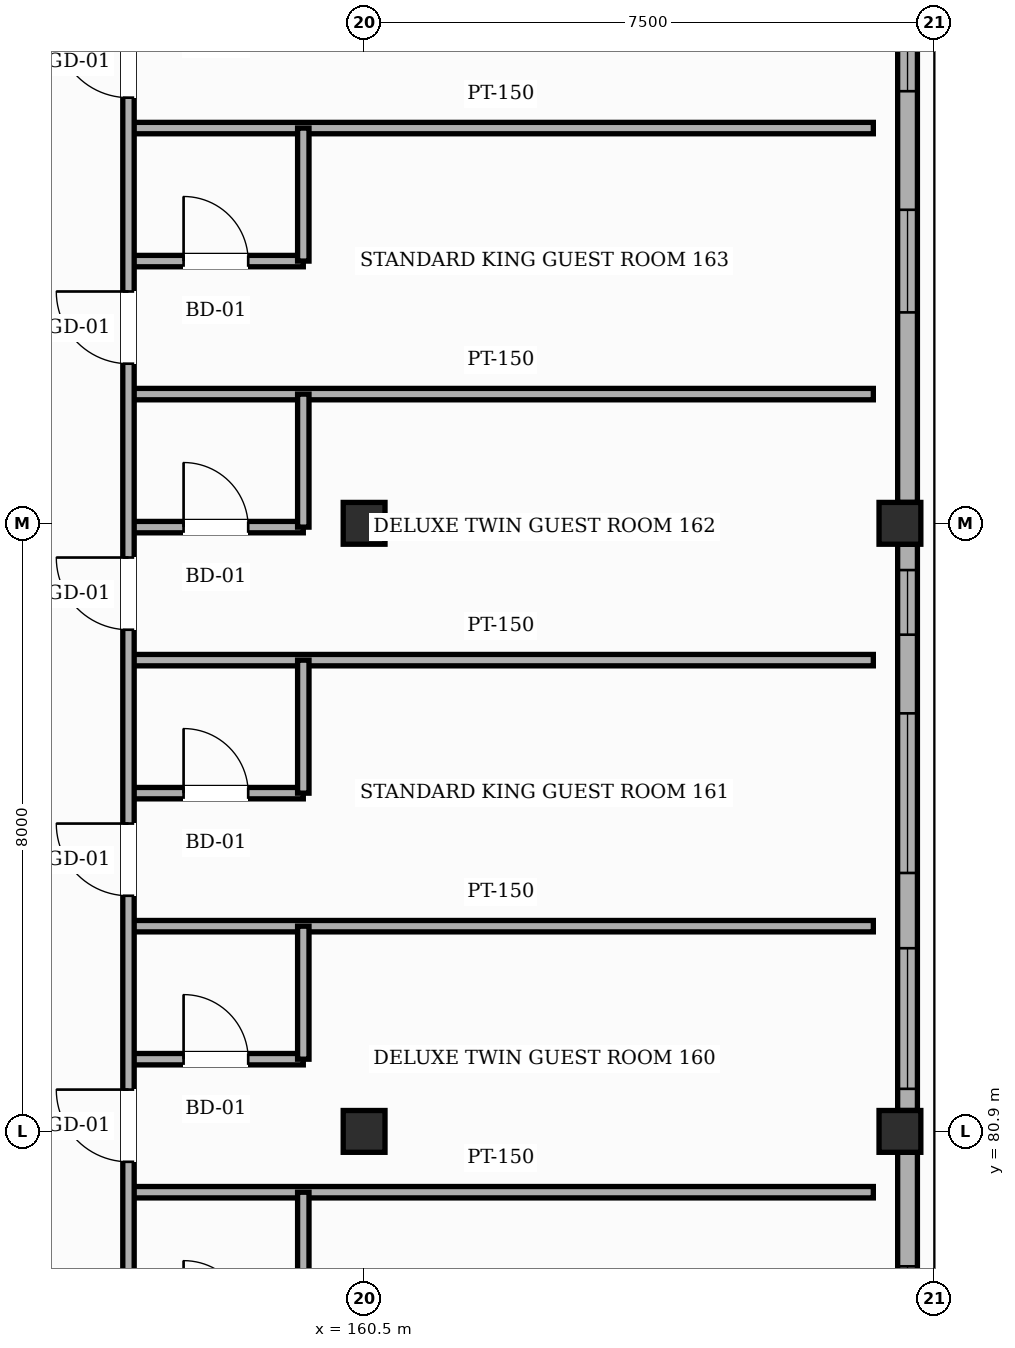
"""IFC4 building model, lengths in metres.
Left out: names, types, materials, properties, quantities, classifications, styles, units other than length and angle.
Written with IfcOpenShell. Run it as: python <this file> out.ifc"""

import sys

from ifc_helpers import new_model, si_unit, direction, frame, frame_2d, origin, origin_2d, place, context, subcontext, project, spatial, rectangle, hollow_rectangle, extrude, element, fill, save


model = new_model("IFC4")
c1 = context("Model", 3, precision=1e-05, world=origin(), true_north=direction((0.0, 1.0)))
c2 = subcontext(c1, "Body", "Model", "MODEL_VIEW")
j1 = project(units=[si_unit("LENGTHUNIT", "METRE"), si_unit("PLANEANGLEUNIT", "RADIAN")], contexts=[c1])
p1 = place(None, origin())
s1 = spatial("IfcSite", under=j1, at=p1, CompositionType="ELEMENT")
p2 = place(p1, origin())
s2 = spatial("IfcBuilding", under=s1, at=p2, CompositionType="ELEMENT")
p3 = place(p2, frame((0.0, 0.0, 28.2)))
s3 = spatial("IfcBuildingStorey", under=s2, at=p3, CompositionType="ELEMENT", Elevation=28.2)
for number, where, z_axis, x_axis in (
    (1, (160.5, 80.9, 0.0), (0.0, 0.0, 1.0), (1.0, 0.0, 0.0)),
    (2, (160.5, 88.9, 0.0), (0.0, 0.0, 1.0), (1.0, 0.0, 0.0)),
    (3, (167.55, 80.9, 0.0), (0.0, 0.0, 1.0), (1.0, 0.0, 0.0)),
    (4, (167.55, 88.9, 0.0), (0.0, 0.0, 1.0), (1.0, 0.0, 0.0)),
):
    element("IfcColumn", number, at=place(p3, frame(where, z_axis=z_axis, x_axis=x_axis)), inside=s3, PredefinedType="COLUMN", context=c2, shape_type="SweptSolid", body=[
        extrude(hollow_rectangle(XDim=0.55, YDim=0.55, WallThickness=0.022, InnerFilletRadius=0.022, OuterFilletRadius=0.044, at=origin_2d()), origin(), (0.0, 0.0, 1.0), 3.6),
    ])
p4 = place(p3, frame((167.65, 80.625, 0.0), z_axis=(0.0, 0.0, 1.0), x_axis=(0.0, -1.0, 0.0)))
e5 = element("IfcWall", 5, at=p4, inside=s3, PredefinedType="SOLIDWALL", context=c2, shape_type="SweptSolid", body=[
    extrude(rectangle(XDim=4.2, YDim=0.26, at=frame_2d((2.1, 0.0))), origin(), (0.0, 0.0, 1.0), 3.365),
])
p5 = place(p4, frame((1.5, 0.0, 0.85)))
e6 = element("IfcOpeningElement", 6, at=p5, cuts=e5, PredefinedType="OPENING", context=c2, shape_type="SweptSolid", body=[
    extrude(rectangle(XDim=1.55, YDim=1.8, at=frame_2d((0.775, 0.9))), frame((0.0, 0.14, 0.0), z_axis=(0.0, -1.0, 0.0), x_axis=(1.0, 0.0, 0.0)), (0.0, 0.0, 1.0), 0.28),
])
p6 = place(p3, frame((167.65, 88.625, 0.0), z_axis=(0.0, 0.0, 1.0), x_axis=(0.0, -1.0, 0.0)))
e7 = element("IfcWall", 7, at=p6, inside=s3, PredefinedType="SOLIDWALL", context=c2, shape_type="SweptSolid", body=[
    extrude(rectangle(XDim=7.45, YDim=0.26, at=frame_2d((3.725, 0.0))), origin(), (0.0, 0.0, 1.0), 2.755),
])
p7 = place(p6, frame((5.315, 0.0, 0.85)))
e8 = element("IfcOpeningElement", 8, at=p7, cuts=e7, PredefinedType="OPENING", context=c2, shape_type="SweptSolid", body=[
    extrude(rectangle(XDim=1.85, YDim=1.35, at=frame_2d((0.925, 0.675))), frame((0.0, 0.14, 0.0), z_axis=(0.0, -1.0, 0.0), x_axis=(1.0, 0.0, 0.0)), (0.0, 0.0, 1.0), 0.28),
])
p8 = place(p6, frame((2.225, 0.0, 0.85)))
e9 = element("IfcOpeningElement", 9, at=p8, cuts=e7, PredefinedType="OPENING", context=c2, shape_type="SweptSolid", body=[
    extrude(rectangle(XDim=2.1, YDim=1.35, at=frame_2d((1.05, 0.675))), frame((0.0, 0.14, 0.0), z_axis=(0.0, -1.0, 0.0), x_axis=(1.0, 0.0, 0.0)), (0.0, 0.0, 1.0), 0.28),
])
p9 = place(p6, frame((0.34, 0.0, 0.85)))
e10 = element("IfcOpeningElement", 10, at=p9, cuts=e7, PredefinedType="OPENING", context=c2, shape_type="SweptSolid", body=[
    extrude(rectangle(XDim=0.85, YDim=1.35, at=frame_2d((0.425, 0.675))), frame((0.0, 0.14, 0.0), z_axis=(0.0, -1.0, 0.0), x_axis=(1.0, 0.0, 0.0)), (0.0, 0.0, 1.0), 0.28),
])
p10 = place(p3, frame((167.65, 96.625, 0.0), z_axis=(0.0, 0.0, 1.0), x_axis=(0.0, -1.0, 0.0)))
e11 = element("IfcWall", 11, at=p10, inside=s3, PredefinedType="SOLIDWALL", context=c2, shape_type="SweptSolid", body=[
    extrude(rectangle(XDim=7.45, YDim=0.26, at=frame_2d((3.725, 0.0))), origin(), (0.0, 0.0, 1.0), 2.755),
])
p11 = place(p10, frame((3.6, 0.0, 0.85)))
e12 = element("IfcOpeningElement", 12, at=p11, cuts=e11, PredefinedType="OPENING", context=c2, shape_type="SweptSolid", body=[
    extrude(rectangle(XDim=1.35, YDim=1.35, at=frame_2d((0.675, 0.675))), frame((0.0, 0.14, 0.0), z_axis=(0.0, -1.0, 0.0), x_axis=(1.0, 0.0, 0.0)), (0.0, 0.0, 1.0), 0.28),
])
p12 = place(p10, frame((0.49, 0.0, 0.85)))
e13 = element("IfcOpeningElement", 13, at=p12, cuts=e11, PredefinedType="OPENING", context=c2, shape_type="SweptSolid", body=[
    extrude(rectangle(XDim=1.55, YDim=1.35, at=frame_2d((0.775, 0.675))), frame((0.0, 0.14, 0.0), z_axis=(0.0, -1.0, 0.0), x_axis=(1.0, 0.0, 0.0)), (0.0, 0.0, 1.0), 0.28),
])
p13 = place(p3, frame((157.4, 80.1, 0.0), z_axis=(0.0, 0.0, 1.0), x_axis=(1.0, 0.0, 0.0)))
e14 = element("IfcWall", 14, at=p13, inside=s3, PredefinedType="PARTITIONING", context=c2, shape_type="SweptSolid", body=[
    extrude(rectangle(XDim=9.8, YDim=0.15, at=frame_2d((4.9, 0.0))), origin(), (0.0, 0.0, 1.0), 3.365),
])
p14 = place(p3, frame((157.4, 81.85, 0.0), z_axis=(0.0, 0.0, 1.0), x_axis=(1.0, 0.0, 0.0)))
e15 = element("IfcWall", 15, at=p14, inside=s3, PredefinedType="PARTITIONING", context=c2, shape_type="SweptSolid", body=[
    extrude(rectangle(XDim=2.3, YDim=0.15, at=frame_2d((1.15, 0.0))), origin(), (0.0, 0.0, 1.0), 3.365),
])
p15 = place(p14, frame((0.725, 0.0, 0.0)))
e16 = element("IfcOpeningElement", 16, at=p15, cuts=e15, PredefinedType="OPENING", context=c2, shape_type="SweptSolid", body=[
    extrude(rectangle(XDim=0.85, YDim=2.1, at=frame_2d((0.425, 1.05))), frame((0.0, 0.085, 0.0), z_axis=(0.0, -1.0, 0.0), x_axis=(1.0, 0.0, 0.0)), (0.0, 0.0, 1.0), 0.17),
])
p16 = place(p3, frame((157.4, 83.6, 0.0), z_axis=(0.0, 0.0, 1.0), x_axis=(1.0, 0.0, 0.0)))
e17 = element("IfcWall", 17, at=p16, inside=s3, PredefinedType="PARTITIONING", context=c2, shape_type="SweptSolid", body=[
    extrude(rectangle(XDim=9.8, YDim=0.15, at=frame_2d((4.9, 0.0))), origin(), (0.0, 0.0, 1.0), 3.365),
])
p17 = place(p3, frame((157.4, 85.35, 0.0), z_axis=(0.0, 0.0, 1.0), x_axis=(1.0, 0.0, 0.0)))
e18 = element("IfcWall", 18, at=p17, inside=s3, PredefinedType="PARTITIONING", context=c2, shape_type="SweptSolid", body=[
    extrude(rectangle(XDim=2.3, YDim=0.15, at=frame_2d((1.15, 0.0))), origin(), (0.0, 0.0, 1.0), 3.365),
])
p18 = place(p17, frame((0.725, 0.0, 0.0)))
e19 = element("IfcOpeningElement", 19, at=p18, cuts=e18, PredefinedType="OPENING", context=c2, shape_type="SweptSolid", body=[
    extrude(rectangle(XDim=0.85, YDim=2.1, at=frame_2d((0.425, 1.05))), frame((0.0, 0.085, 0.0), z_axis=(0.0, -1.0, 0.0), x_axis=(1.0, 0.0, 0.0)), (0.0, 0.0, 1.0), 0.17),
])
p19 = place(p3, frame((157.4, 87.1, 0.0), z_axis=(0.0, 0.0, 1.0), x_axis=(1.0, 0.0, 0.0)))
e20 = element("IfcWall", 20, at=p19, inside=s3, PredefinedType="PARTITIONING", context=c2, shape_type="SweptSolid", body=[
    extrude(rectangle(XDim=9.8, YDim=0.15, at=frame_2d((4.9, 0.0))), origin(), (0.0, 0.0, 1.0), 3.365),
])
p20 = place(p3, frame((157.4, 88.85, 0.0), z_axis=(0.0, 0.0, 1.0), x_axis=(1.0, 0.0, 0.0)))
e21 = element("IfcWall", 21, at=p20, inside=s3, PredefinedType="PARTITIONING", context=c2, shape_type="SweptSolid", body=[
    extrude(rectangle(XDim=2.3, YDim=0.15, at=frame_2d((1.15, 0.0))), origin(), (0.0, 0.0, 1.0), 2.805),
])
p21 = place(p20, frame((0.725, 0.0, 0.0)))
e22 = element("IfcOpeningElement", 22, at=p21, cuts=e21, PredefinedType="OPENING", context=c2, shape_type="SweptSolid", body=[
    extrude(rectangle(XDim=0.85, YDim=2.1, at=frame_2d((0.425, 1.05))), frame((0.0, 0.085, 0.0), z_axis=(0.0, -1.0, 0.0), x_axis=(1.0, 0.0, 0.0)), (0.0, 0.0, 1.0), 0.17),
])
p22 = place(p3, frame((157.4, 90.6, 0.0), z_axis=(0.0, 0.0, 1.0), x_axis=(1.0, 0.0, 0.0)))
e23 = element("IfcWall", 23, at=p22, inside=s3, PredefinedType="PARTITIONING", context=c2, shape_type="SweptSolid", body=[
    extrude(rectangle(XDim=9.8, YDim=0.15, at=frame_2d((4.9, 0.0))), origin(), (0.0, 0.0, 1.0), 3.365),
])
p23 = place(p3, frame((157.4, 92.35, 0.0), z_axis=(0.0, 0.0, 1.0), x_axis=(1.0, 0.0, 0.0)))
e24 = element("IfcWall", 24, at=p23, inside=s3, PredefinedType="PARTITIONING", context=c2, shape_type="SweptSolid", body=[
    extrude(rectangle(XDim=2.3, YDim=0.15, at=frame_2d((1.15, 0.0))), origin(), (0.0, 0.0, 1.0), 3.365),
])
p24 = place(p23, frame((0.725, 0.0, 0.0)))
e25 = element("IfcOpeningElement", 25, at=p24, cuts=e24, PredefinedType="OPENING", context=c2, shape_type="SweptSolid", body=[
    extrude(rectangle(XDim=0.85, YDim=2.1, at=frame_2d((0.425, 1.05))), frame((0.0, 0.085, 0.0), z_axis=(0.0, -1.0, 0.0), x_axis=(1.0, 0.0, 0.0)), (0.0, 0.0, 1.0), 0.17),
])
p25 = place(p3, frame((157.4, 94.1, 0.0), z_axis=(0.0, 0.0, 1.0), x_axis=(1.0, 0.0, 0.0)))
e26 = element("IfcWall", 26, at=p25, inside=s3, PredefinedType="PARTITIONING", context=c2, shape_type="SweptSolid", body=[
    extrude(rectangle(XDim=9.8, YDim=0.15, at=frame_2d((4.9, 0.0))), origin(), (0.0, 0.0, 1.0), 3.365),
])
p26 = place(p3, frame((157.4, 76.6, 0.0), z_axis=(0.0, 0.0, 1.0), x_axis=(0.0, 1.0, 0.0)))
e27 = element("IfcWall", 27, at=p26, inside=s3, PredefinedType="PARTITIONING", context=c2, shape_type="SweptSolid", body=[
    extrude(rectangle(XDim=28.0, YDim=0.15, at=frame_2d((14.0, 0.0))), origin(), (0.0, 0.0, 1.0), 3.365),
])
p27 = place(p26, frame((0.325, 0.0, 0.0)))
e28 = element("IfcOpeningElement", 28, at=p27, cuts=e27, PredefinedType="OPENING", context=c2, shape_type="SweptSolid", body=[
    extrude(rectangle(XDim=1.1, YDim=2.2, at=frame_2d((0.55, 1.1))), frame((0.0, 0.085, 0.0), z_axis=(0.0, -1.0, 0.0), x_axis=(1.0, 0.0, 0.0)), (0.0, 0.0, 1.0), 0.17),
])
p28 = place(p26, frame((3.9, 0.0, 0.0)))
e29 = element("IfcOpeningElement", 29, at=p28, cuts=e27, PredefinedType="OPENING", context=c2, shape_type="SweptSolid", body=[
    extrude(rectangle(XDim=0.95, YDim=2.15, at=frame_2d((0.475, 1.075))), frame((0.0, 0.085, 0.0), z_axis=(0.0, -1.0, 0.0), x_axis=(1.0, 0.0, 0.0)), (0.0, 0.0, 1.0), 0.17),
])
p29 = place(p26, frame((7.4, 0.0, 0.0)))
e30 = element("IfcOpeningElement", 30, at=p29, cuts=e27, PredefinedType="OPENING", context=c2, shape_type="SweptSolid", body=[
    extrude(rectangle(XDim=0.95, YDim=2.15, at=frame_2d((0.475, 1.075))), frame((0.0, 0.085, 0.0), z_axis=(0.0, -1.0, 0.0), x_axis=(1.0, 0.0, 0.0)), (0.0, 0.0, 1.0), 0.17),
])
p30 = place(p26, frame((10.9, 0.0, 0.0)))
e31 = element("IfcOpeningElement", 31, at=p30, cuts=e27, PredefinedType="OPENING", context=c2, shape_type="SweptSolid", body=[
    extrude(rectangle(XDim=0.95, YDim=2.15, at=frame_2d((0.475, 1.075))), frame((0.0, 0.085, 0.0), z_axis=(0.0, -1.0, 0.0), x_axis=(1.0, 0.0, 0.0)), (0.0, 0.0, 1.0), 0.17),
])
p31 = place(p26, frame((14.4, 0.0, 0.0)))
e32 = element("IfcOpeningElement", 32, at=p31, cuts=e27, PredefinedType="OPENING", context=c2, shape_type="SweptSolid", body=[
    extrude(rectangle(XDim=0.95, YDim=2.15, at=frame_2d((0.475, 1.075))), frame((0.0, 0.085, 0.0), z_axis=(0.0, -1.0, 0.0), x_axis=(1.0, 0.0, 0.0)), (0.0, 0.0, 1.0), 0.17),
])
p32 = place(p26, frame((17.9, 0.0, 0.0)))
e33 = element("IfcOpeningElement", 33, at=p32, cuts=e27, PredefinedType="OPENING", context=c2, shape_type="SweptSolid", body=[
    extrude(rectangle(XDim=0.95, YDim=2.15, at=frame_2d((0.475, 1.075))), frame((0.0, 0.085, 0.0), z_axis=(0.0, -1.0, 0.0), x_axis=(1.0, 0.0, 0.0)), (0.0, 0.0, 1.0), 0.17),
])
p33 = place(p26, frame((21.4, 0.0, 0.0)))
e34 = element("IfcOpeningElement", 34, at=p33, cuts=e27, PredefinedType="OPENING", context=c2, shape_type="SweptSolid", body=[
    extrude(rectangle(XDim=0.95, YDim=2.15, at=frame_2d((0.475, 1.075))), frame((0.0, 0.085, 0.0), z_axis=(0.0, -1.0, 0.0), x_axis=(1.0, 0.0, 0.0)), (0.0, 0.0, 1.0), 0.17),
])
p34 = place(p26, frame((24.9, 0.0, 0.0)))
e35 = element("IfcOpeningElement", 35, at=p34, cuts=e27, PredefinedType="OPENING", context=c2, shape_type="SweptSolid", body=[
    extrude(rectangle(XDim=0.95, YDim=2.15, at=frame_2d((0.475, 1.075))), frame((0.0, 0.085, 0.0), z_axis=(0.0, -1.0, 0.0), x_axis=(1.0, 0.0, 0.0)), (0.0, 0.0, 1.0), 0.17),
])
for number, where, z_axis, x_axis in (
    (36, (159.7, 78.35, 0.0), (0.0, 0.0, 1.0), (0.0, 1.0, 0.0)),
    (37, (159.7, 81.85, 0.0), (0.0, 0.0, 1.0), (0.0, 1.0, 0.0)),
    (38, (159.7, 85.35, 0.0), (0.0, 0.0, 1.0), (0.0, 1.0, 0.0)),
    (39, (159.7, 88.85, 0.0), (0.0, 0.0, 1.0), (0.0, 1.0, 0.0)),
    (40, (159.7, 92.35, 0.0), (0.0, 0.0, 1.0), (0.0, 1.0, 0.0)),
):
    element("IfcWall", number, at=place(p3, frame(where, z_axis=z_axis, x_axis=x_axis)), inside=s3, PredefinedType="PARTITIONING", context=c2, shape_type="SweptSolid", body=[
        extrude(rectangle(XDim=1.75, YDim=0.15, at=frame_2d((0.875, 0.0))), origin(), (0.0, 0.0, 1.0), 3.365),
    ])
p35 = place(p5, origin())
e41 = element("IfcWindow", 41, at=p35, inside=s3, PartitioningType="SINGLE_PANEL", PredefinedType="WINDOW", context=c2, shape_type="SweptSolid", body=[
    extrude(rectangle(XDim=1.55, YDim=1.8, at=frame_2d((0.775, 0.9))), frame((0.0, 0.03, 0.0), z_axis=(0.0, -1.0, 0.0), x_axis=(1.0, 0.0, 0.0)), (0.0, 0.0, 1.0), 0.06),
])
fill(e6, e41)
p36 = place(p7, origin())
e42 = element("IfcWindow", 42, at=p36, inside=s3, PartitioningType="SINGLE_PANEL", PredefinedType="WINDOW", context=c2, shape_type="SweptSolid", body=[
    extrude(rectangle(XDim=1.85, YDim=1.35, at=frame_2d((0.925, 0.675))), frame((0.0, 0.03, 0.0), z_axis=(0.0, -1.0, 0.0), x_axis=(1.0, 0.0, 0.0)), (0.0, 0.0, 1.0), 0.06),
])
fill(e8, e42)
p37 = place(p8, origin())
e43 = element("IfcWindow", 43, at=p37, inside=s3, PartitioningType="SINGLE_PANEL", PredefinedType="WINDOW", context=c2, shape_type="SweptSolid", body=[
    extrude(rectangle(XDim=2.1, YDim=1.35, at=frame_2d((1.05, 0.675))), frame((0.0, 0.03, 0.0), z_axis=(0.0, -1.0, 0.0), x_axis=(1.0, 0.0, 0.0)), (0.0, 0.0, 1.0), 0.06),
])
fill(e9, e43)
p38 = place(p9, origin())
e44 = element("IfcWindow", 44, at=p38, inside=s3, PartitioningType="SINGLE_PANEL", PredefinedType="WINDOW", context=c2, shape_type="SweptSolid", body=[
    extrude(rectangle(XDim=0.85, YDim=1.35, at=frame_2d((0.425, 0.675))), frame((0.0, 0.03, 0.0), z_axis=(0.0, -1.0, 0.0), x_axis=(1.0, 0.0, 0.0)), (0.0, 0.0, 1.0), 0.06),
])
fill(e10, e44)
p39 = place(p11, origin())
e45 = element("IfcWindow", 45, at=p39, inside=s3, PartitioningType="SINGLE_PANEL", PredefinedType="WINDOW", context=c2, shape_type="SweptSolid", body=[
    extrude(rectangle(XDim=1.35, YDim=1.35, at=frame_2d((0.675, 0.675))), frame((0.0, 0.03, 0.0), z_axis=(0.0, -1.0, 0.0), x_axis=(1.0, 0.0, 0.0)), (0.0, 0.0, 1.0), 0.06),
])
fill(e12, e45)
p40 = place(p12, origin())
e46 = element("IfcWindow", 46, at=p40, inside=s3, PartitioningType="SINGLE_PANEL", PredefinedType="WINDOW", context=c2, shape_type="SweptSolid", body=[
    extrude(rectangle(XDim=1.55, YDim=1.35, at=frame_2d((0.775, 0.675))), frame((0.0, 0.03, 0.0), z_axis=(0.0, -1.0, 0.0), x_axis=(1.0, 0.0, 0.0)), (0.0, 0.0, 1.0), 0.06),
])
fill(e13, e46)
p41 = place(p28, origin())
e47 = element("IfcDoor", 47, at=p41, inside=s3, OperationType="SINGLE_SWING_RIGHT", PredefinedType="DOOR", context=c2, shape_type="SweptSolid", body=[
    extrude(rectangle(XDim=0.95, YDim=2.15, at=frame_2d((0.475, 1.075))), frame((0.0, 0.025, 0.0), z_axis=(0.0, -1.0, 0.0), x_axis=(1.0, 0.0, 0.0)), (0.0, 0.0, 1.0), 0.05),
])
fill(e29, e47)
p42 = place(p15, origin())
e48 = element("IfcDoor", 48, at=p42, inside=s3, OperationType="SINGLE_SWING_LEFT", PredefinedType="DOOR", context=c2, shape_type="SweptSolid", body=[
    extrude(rectangle(XDim=0.85, YDim=2.1, at=frame_2d((0.425, 1.05))), frame((0.0, 0.025, 0.0), z_axis=(0.0, -1.0, 0.0), x_axis=(1.0, 0.0, 0.0)), (0.0, 0.0, 1.0), 0.05),
])
fill(e16, e48)
p43 = place(p29, origin())
e49 = element("IfcDoor", 49, at=p43, inside=s3, OperationType="SINGLE_SWING_RIGHT", PredefinedType="DOOR", context=c2, shape_type="SweptSolid", body=[
    extrude(rectangle(XDim=0.95, YDim=2.15, at=frame_2d((0.475, 1.075))), frame((0.0, 0.025, 0.0), z_axis=(0.0, -1.0, 0.0), x_axis=(1.0, 0.0, 0.0)), (0.0, 0.0, 1.0), 0.05),
])
fill(e30, e49)
p44 = place(p18, origin())
e50 = element("IfcDoor", 50, at=p44, inside=s3, OperationType="SINGLE_SWING_LEFT", PredefinedType="DOOR", context=c2, shape_type="SweptSolid", body=[
    extrude(rectangle(XDim=0.85, YDim=2.1, at=frame_2d((0.425, 1.05))), frame((0.0, 0.025, 0.0), z_axis=(0.0, -1.0, 0.0), x_axis=(1.0, 0.0, 0.0)), (0.0, 0.0, 1.0), 0.05),
])
fill(e19, e50)
p45 = place(p30, origin())
e51 = element("IfcDoor", 51, at=p45, inside=s3, OperationType="SINGLE_SWING_RIGHT", PredefinedType="DOOR", context=c2, shape_type="SweptSolid", body=[
    extrude(rectangle(XDim=0.95, YDim=2.15, at=frame_2d((0.475, 1.075))), frame((0.0, 0.025, 0.0), z_axis=(0.0, -1.0, 0.0), x_axis=(1.0, 0.0, 0.0)), (0.0, 0.0, 1.0), 0.05),
])
fill(e31, e51)
p46 = place(p21, origin())
e52 = element("IfcDoor", 52, at=p46, inside=s3, OperationType="SINGLE_SWING_LEFT", PredefinedType="DOOR", context=c2, shape_type="SweptSolid", body=[
    extrude(rectangle(XDim=0.85, YDim=2.1, at=frame_2d((0.425, 1.05))), frame((0.0, 0.025, 0.0), z_axis=(0.0, -1.0, 0.0), x_axis=(1.0, 0.0, 0.0)), (0.0, 0.0, 1.0), 0.05),
])
fill(e22, e52)
p47 = place(p31, origin())
e53 = element("IfcDoor", 53, at=p47, inside=s3, OperationType="SINGLE_SWING_RIGHT", PredefinedType="DOOR", context=c2, shape_type="SweptSolid", body=[
    extrude(rectangle(XDim=0.95, YDim=2.15, at=frame_2d((0.475, 1.075))), frame((0.0, 0.025, 0.0), z_axis=(0.0, -1.0, 0.0), x_axis=(1.0, 0.0, 0.0)), (0.0, 0.0, 1.0), 0.05),
])
fill(e32, e53)
p48 = place(p24, origin())
e54 = element("IfcDoor", 54, at=p48, inside=s3, OperationType="SINGLE_SWING_LEFT", PredefinedType="DOOR", context=c2, shape_type="SweptSolid", body=[
    extrude(rectangle(XDim=0.85, YDim=2.1, at=frame_2d((0.425, 1.05))), frame((0.0, 0.025, 0.0), z_axis=(0.0, -1.0, 0.0), x_axis=(1.0, 0.0, 0.0)), (0.0, 0.0, 1.0), 0.05),
])
fill(e25, e54)
p49 = place(p32, origin())
e55 = element("IfcDoor", 55, at=p49, inside=s3, OperationType="SINGLE_SWING_RIGHT", PredefinedType="DOOR", context=c2, shape_type="SweptSolid", body=[
    extrude(rectangle(XDim=0.95, YDim=2.15, at=frame_2d((0.475, 1.075))), frame((0.0, 0.025, 0.0), z_axis=(0.0, -1.0, 0.0), x_axis=(1.0, 0.0, 0.0)), (0.0, 0.0, 1.0), 0.05),
])
fill(e33, e55)
save(model, sys.argv[1])
